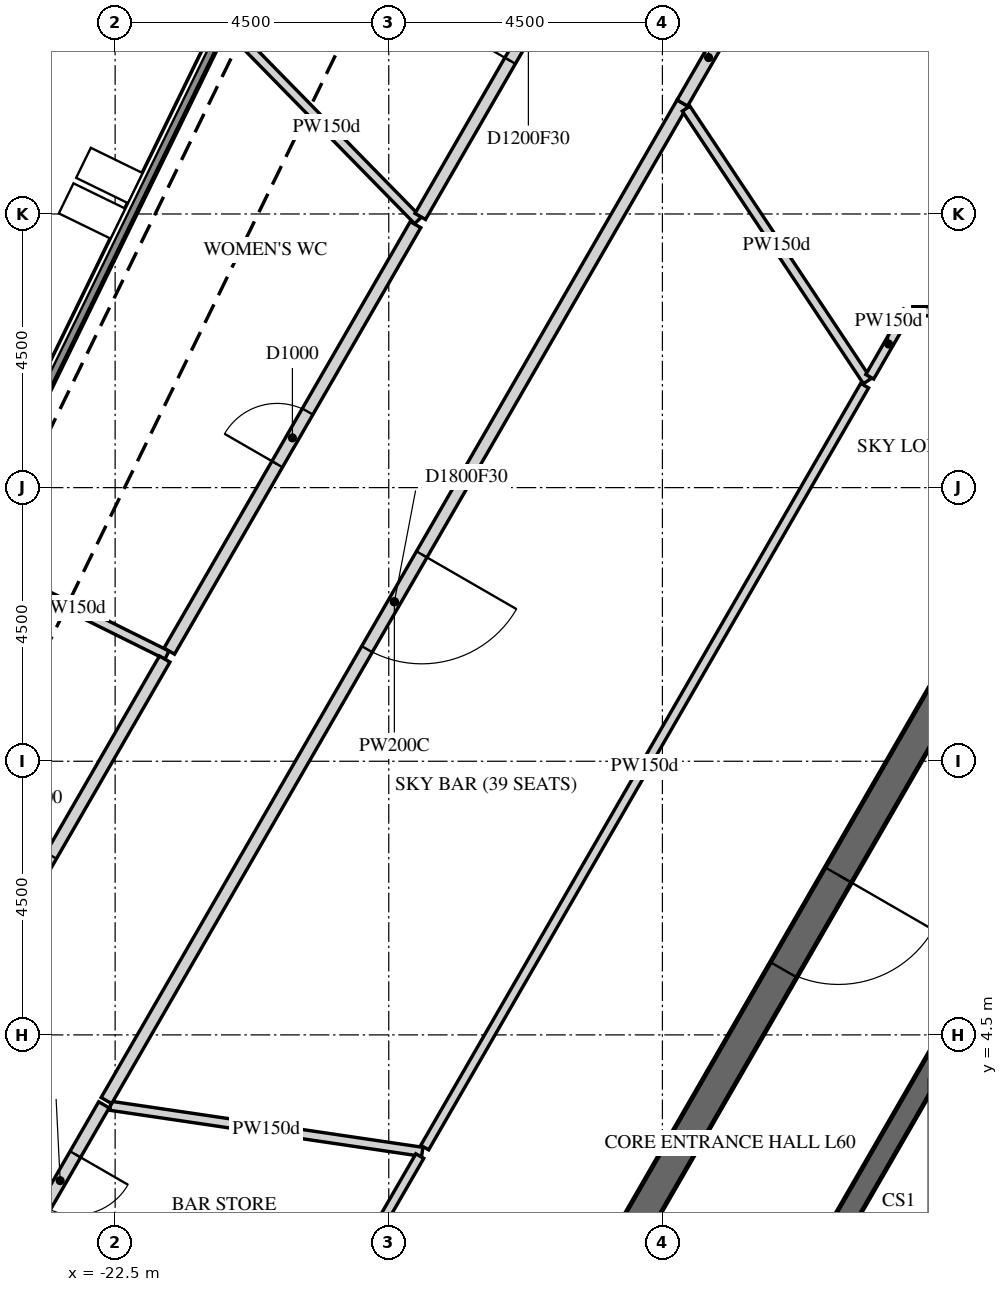
"""IFC4 building model, lengths in metres.
Left out: names, types, materials, properties, quantities, classifications, styles, units other than length and angle.
Written with IfcOpenShell. Run it as: python <this file> out.ifc"""

import sys

from ifc_helpers import new_model, si_unit, direction, frame, frame_2d, origin, place, context, subcontext, project, spatial, polyline, rectangle, outline, extrude, element, fill, save


model = new_model("IFC4")
c1 = context("Model", 3, precision=1e-05, world=origin(), true_north=direction((0.0, 1.0)))
c2 = subcontext(c1, "Body", "Model", "MODEL_VIEW")
j1 = project(units=[si_unit("LENGTHUNIT", "METRE"), si_unit("PLANEANGLEUNIT", "RADIAN")], contexts=[c1])
p1 = place(None, origin())
s1 = spatial("IfcSite", under=j1, at=p1, CompositionType="ELEMENT")
p2 = place(p1, origin())
s2 = spatial("IfcBuilding", under=s1, at=p2, CompositionType="ELEMENT")
p3 = place(p2, frame((0.0, 0.0, 250.2)))
s3 = spatial("IfcBuildingStorey", under=s2, at=p3, CompositionType="ELEMENT", Elevation=250.2)
p4 = place(p3, frame((-30.667, 0.768, 5.7), z_axis=(0.0, 0.0, 1.0), x_axis=(0.43836623679, 0.898796441049, 0.0)))
e1 = element("IfcWall", 1, at=p4, inside=s3, PredefinedType="PARAPET", context=c2, shape_type="SweptSolid", body=[
    extrude(outline(polyline([(0.008, -0.1), (27.731, -0.1), (27.75, 0.1), (-0.008, 0.1), (0.008, -0.1)])), origin(), (0.0, 0.0, 1.0), 1.1),
])
p5 = place(p3, frame((-7.361, 12.75, -0.3), z_axis=(0.0, 0.0, 1.0), x_axis=(-0.50000571537, -0.866022103989, 0.0)))
e2 = element("IfcWall", 2, at=p5, inside=s3, PredefinedType="SHEAR", context=c2, shape_type="SweptSolid", body=[
    extrude(outline(polyline([(-0.144, -0.25), (14.867, -0.25), (14.578, 0.25), (0.144, 0.25), (-0.144, -0.25)])), origin(), (0.0, 0.0, 1.0), 5.8),
])
p6 = place(p5, frame((6.49, 0.0, 0.3)))
e3 = element("IfcOpeningElement", 3, at=p6, cuts=e2, PredefinedType="OPENING", context=c2, shape_type="SweptSolid", body=[
    extrude(rectangle(XDim=1.8, YDim=2.4, at=frame_2d((0.9, 1.2))), frame((0.0, 0.26, 0.0), z_axis=(0.0, -1.0, 0.0), x_axis=(1.0, 0.0, 0.0)), (0.0, 0.0, 1.0), 0.52),
])
p7 = place(p3, frame((-5.673, 9.825, -0.3), z_axis=(0.0, 0.0, 1.0), x_axis=(-0.499995046907, -0.866028263435, 0.0)))
e4 = element("IfcWall", 4, at=p7, inside=s3, PredefinedType="SHEAR", context=c2, shape_type="SweptSolid", body=[
    extrude(outline(polyline([(-0.101, -0.175), (11.446, -0.175), (11.244, 0.175), (0.101, 0.175), (-0.101, -0.175)])), origin(), (0.0, 0.0, 1.0), 5.8),
])
p8 = place(p7, frame((4.801, 0.0, 0.3)))
e5 = element("IfcOpeningElement", 5, at=p8, cuts=e4, PredefinedType="OPENING", context=c2, shape_type="SweptSolid", body=[
    extrude(rectangle(XDim=1.8, YDim=2.4, at=frame_2d((0.9, 1.2))), frame((0.0, 0.185, 0.0), z_axis=(0.0, -1.0, 0.0), x_axis=(1.0, 0.0, 0.0)), (0.0, 0.0, 1.0), 0.37),
])
p9 = place(p3, frame((-24.767, 12.295, 0.0), z_axis=(0.0, 0.0, 1.0), x_axis=(0.895713074793, -0.444632531024, 0.0)))
e6 = element("IfcWall", 6, at=p9, inside=s3, PredefinedType="PARTITIONING", context=c2, shape_type="SweptSolid", body=[
    extrude(rectangle(XDim=3.483, YDim=0.15, at=frame_2d((1.742, 0.0))), origin(), (0.0, 0.0, 1.0), 5.5),
])
p10 = place(p3, frame((-22.684, 3.35, 0.0), z_axis=(0.0, 0.0, 1.0), x_axis=(-0.500041240653, -0.866001592173, 0.0)))
e7 = element("IfcWall", 7, at=p10, inside=s3, PredefinedType="PARTITIONING", context=c2, shape_type="SweptSolid", body=[
    extrude(rectangle(XDim=3.58, YDim=0.2, at=frame_2d((1.79, 0.0))), origin(), (0.0, 0.0, 1.0), 5.5),
])
p11 = place(p10, frame((0.94, 0.0, 0.0)))
e8 = element("IfcOpeningElement", 8, at=p11, cuts=e7, PredefinedType="OPENING", context=c2, shape_type="SweptSolid", body=[
    extrude(rectangle(XDim=1.0, YDim=2.1, at=frame_2d((0.5, 1.05))), frame((0.0, 0.11, 0.0), z_axis=(0.0, -1.0, 0.0), x_axis=(1.0, 0.0, 0.0)), (0.0, 0.0, 1.0), 0.22),
])
p12 = place(p3, frame((-22.578, 3.334, 0.0), z_axis=(0.0, 0.0, 1.0), x_axis=(0.989272631556, -0.146081006478, 0.0)))
e9 = element("IfcWall", 9, at=p12, inside=s3, PredefinedType="PARTITIONING", context=c2, shape_type="SweptSolid", body=[
    extrude(rectangle(XDim=5.184, YDim=0.15, at=frame_2d((2.592, 0.0))), origin(), (0.0, 0.0, 1.0), 5.5),
])
p13 = place(p3, frame((-13.172, 19.825, 0.0), z_axis=(0.0, 0.0, 1.0), x_axis=(-0.499999503755, -0.866025690291, 0.0)))
e10 = element("IfcWall", 10, at=p13, inside=s3, PredefinedType="PARTITIONING", context=c2, shape_type="SweptSolid", body=[
    extrude(rectangle(XDim=18.943, YDim=0.2, at=frame_2d((9.471, 0.0))), origin(), (0.0, 0.0, 1.0), 5.5),
])
p14 = place(p13, frame((8.572, 0.0, 0.0)))
e11 = element("IfcOpeningElement", 11, at=p14, cuts=e10, PredefinedType="OPENING", context=c2, shape_type="SweptSolid", body=[
    extrude(rectangle(XDim=1.8, YDim=2.1, at=frame_2d((0.9, 1.05))), frame((0.0, 0.11, 0.0), z_axis=(0.0, -1.0, 0.0), x_axis=(1.0, 0.0, 0.0)), (0.0, 0.0, 1.0), 0.22),
])
p15 = place(p3, frame((-25.917, 3.349, 0.0), z_axis=(0.0, 0.0, 1.0), x_axis=(0.499982078236, 0.866035750673, 0.0)))
e12 = element("IfcWall", 12, at=p15, inside=s3, PredefinedType="PARTITIONING", context=c2, shape_type="SweptSolid", body=[
    extrude(rectangle(XDim=8.466, YDim=0.2, at=frame_2d((4.233, 0.0))), origin(), (0.0, 0.0, 1.0), 5.5),
])
p16 = place(p15, frame((3.733, 0.0, 0.0)))
e13 = element("IfcOpeningElement", 13, at=p16, cuts=e12, PredefinedType="OPENING", context=c2, shape_type="SweptSolid", body=[
    extrude(rectangle(XDim=1.0, YDim=2.1, at=frame_2d((0.5, 1.05))), frame((0.0, 0.11, 0.0), z_axis=(0.0, -1.0, 0.0), x_axis=(1.0, 0.0, 0.0)), (0.0, 0.0, 1.0), 0.22),
])
p17 = place(p3, frame((-20.527, 20.962, 0.0), z_axis=(0.0, 0.0, 1.0), x_axis=(0.699623583843, -0.714511610074, 0.0)))
e14 = element("IfcWall", 14, at=p17, inside=s3, PredefinedType="PARTITIONING", context=c2, shape_type="SweptSolid", body=[
    extrude(rectangle(XDim=4.296, YDim=0.15, at=frame_2d((2.148, 0.0))), origin(), (0.0, 0.0, 1.0), 5.5),
])
p18 = place(p3, frame((-21.609, 10.811, 0.0), z_axis=(0.0, 0.0, 1.0), x_axis=(0.500032982845, 0.866006360293, 0.0)))
e15 = element("IfcWall", 15, at=p18, inside=s3, PredefinedType="PARTITIONING", context=c2, shape_type="SweptSolid", body=[
    extrude(rectangle(XDim=8.099, YDim=0.2, at=frame_2d((4.049, 0.0))), origin(), (0.0, 0.0, 1.0), 5.5),
])
p19 = place(p18, frame((3.549, 0.0, 0.0)))
e16 = element("IfcOpeningElement", 16, at=p19, cuts=e15, PredefinedType="OPENING", context=c2, shape_type="SweptSolid", body=[
    extrude(rectangle(XDim=1.0, YDim=2.1, at=frame_2d((0.5, 1.05))), frame((0.0, 0.11, 0.0), z_axis=(0.0, -1.0, 0.0), x_axis=(1.0, 0.0, 0.0)), (0.0, 0.0, 1.0), 0.22),
])
p20 = place(p3, frame((-17.489, 2.507, 0.0), z_axis=(0.0, 0.0, 1.0), x_axis=(-0.500168359116, -0.865928179781, 0.0)))
e17 = element("IfcWall", 17, at=p20, inside=s3, PredefinedType="PARTITIONING", context=c2, shape_type="SweptSolid", body=[
    extrude(rectangle(XDim=2.606, YDim=0.15, at=frame_2d((1.303, 0.0))), origin(), (0.0, 0.0, 1.0), 5.5),
])
p21 = place(p3, frame((-17.482, 17.959, 0.0), z_axis=(0.0, 0.0, 1.0), x_axis=(0.499926463787, 0.866067855774, 0.0)))
e18 = element("IfcWall", 18, at=p21, inside=s3, PredefinedType="PARTITIONING", context=c2, shape_type="SweptSolid", body=[
    extrude(rectangle(XDim=7.113, YDim=0.2, at=frame_2d((3.557, 0.0))), origin(), (0.0, 0.0, 1.0), 4.573),
])
p22 = place(p21, frame((2.957, 0.0, 0.0)))
e19 = element("IfcOpeningElement", 19, at=p22, cuts=e18, PredefinedType="OPENING", context=c2, shape_type="SweptSolid", body=[
    extrude(rectangle(XDim=1.2, YDim=2.1, at=frame_2d((0.6, 1.05))), frame((0.0, 0.11, 0.0), z_axis=(0.0, -1.0, 0.0), x_axis=(1.0, 0.0, 0.0)), (0.0, 0.0, 1.0), 0.22),
])
p23 = place(p3, frame((-13.172, 19.825, 0.0), z_axis=(0.0, 0.0, 1.0), x_axis=(0.49992648901, 0.866067841215, 0.0)))
e20 = element("IfcWall", 20, at=p23, inside=s3, PredefinedType="PARTITIONING", context=c2, shape_type="SweptSolid", body=[
    extrude(rectangle(XDim=1.726, YDim=0.2, at=frame_2d((0.863, 0.0))), origin(), (0.0, 0.0, 1.0), 4.573),
])
p24 = place(p3, frame((-13.11, 19.732, 0.0), z_axis=(0.0, 0.0, 1.0), x_axis=(0.553422205017, -0.83290087225, 0.0)))
e21 = element("IfcWall", 21, at=p24, inside=s3, PredefinedType="PARTITIONING", context=c2, shape_type="SweptSolid", body=[
    extrude(rectangle(XDim=5.381, YDim=0.15, at=frame_2d((2.69, 0.0))), origin(), (0.0, 0.0, 1.0), 5.5),
])
p25 = place(p3, frame((-10.174, 15.177, 0.0), z_axis=(0.0, 0.0, 1.0), x_axis=(-0.500018949701, -0.866014462893, 0.0)))
e22 = element("IfcWall", 22, at=p25, inside=s3, PredefinedType="PARTITIONING", context=c2, shape_type="SweptSolid", body=[
    extrude(rectangle(XDim=14.469, YDim=0.15, at=frame_2d((7.235, 0.0))), origin(), (0.0, 0.0, 1.0), 5.5),
])
p26 = place(p3, frame((-9.469, 16.4, 0.0), z_axis=(0.0, 0.0, 1.0), x_axis=(-0.499433504563, -0.866352223128, 0.0)))
e23 = element("IfcWall", 23, at=p26, inside=s3, PredefinedType="PARTITIONING", context=c2, shape_type="SweptSolid", body=[
    extrude(rectangle(XDim=1.244, YDim=0.15, at=frame_2d((0.622, 0.0))), origin(), (0.0, 0.0, 1.0), 5.5),
])
p27 = place(p3, frame((6.493, 16.4, 0.0), z_axis=(0.0, 0.0, 1.0), x_axis=(-1.0, 0.0, 0.0)))
e24 = element("IfcWall", 24, at=p27, inside=s3, PredefinedType="PARTITIONING", context=c2, shape_type="SweptSolid", body=[
    extrude(rectangle(XDim=15.875, YDim=0.15, at=frame_2d((7.938, 0.0))), origin(), (0.0, 0.0, 1.0), 5.5),
])
p28 = place(p6, origin())
e25 = element("IfcDoor", 25, at=p28, inside=s3, OperationType="DOUBLE_DOOR_SINGLE_SWING", PredefinedType="DOOR", context=c2, shape_type="SweptSolid", body=[
    extrude(rectangle(XDim=1.8, YDim=2.4, at=frame_2d((0.9, 1.2))), frame((0.0, 0.025, 0.0), z_axis=(0.0, -1.0, 0.0), x_axis=(1.0, 0.0, 0.0)), (0.0, 0.0, 1.0), 0.05),
])
fill(e3, e25)
p29 = place(p11, origin())
e26 = element("IfcDoor", 26, at=p29, inside=s3, OperationType="SINGLE_SWING_RIGHT", PredefinedType="DOOR", context=c2, shape_type="SweptSolid", body=[
    extrude(rectangle(XDim=1.0, YDim=2.1, at=frame_2d((0.5, 1.05))), frame((0.0, 0.025, 0.0), z_axis=(0.0, -1.0, 0.0), x_axis=(1.0, 0.0, 0.0)), (0.0, 0.0, 1.0), 0.05),
])
fill(e8, e26)
p30 = place(p14, origin())
e27 = element("IfcDoor", 27, at=p30, inside=s3, OperationType="DOUBLE_DOOR_SINGLE_SWING", PredefinedType="DOOR", context=c2, shape_type="SweptSolid", body=[
    extrude(rectangle(XDim=1.8, YDim=2.1, at=frame_2d((0.9, 1.05))), frame((0.0, 0.025, 0.0), z_axis=(0.0, -1.0, 0.0), x_axis=(1.0, 0.0, 0.0)), (0.0, 0.0, 1.0), 0.05),
])
fill(e11, e27)
p31 = place(p16, origin())
e28 = element("IfcDoor", 28, at=p31, inside=s3, OperationType="SINGLE_SWING_RIGHT", PredefinedType="DOOR", context=c2, shape_type="SweptSolid", body=[
    extrude(rectangle(XDim=1.0, YDim=2.1, at=frame_2d((0.5, 1.05))), frame((0.0, 0.025, 0.0), z_axis=(0.0, -1.0, 0.0), x_axis=(1.0, 0.0, 0.0)), (0.0, 0.0, 1.0), 0.05),
])
fill(e13, e28)
p32 = place(p19, origin())
e29 = element("IfcDoor", 29, at=p32, inside=s3, OperationType="SINGLE_SWING_RIGHT", PredefinedType="DOOR", context=c2, shape_type="SweptSolid", body=[
    extrude(rectangle(XDim=1.0, YDim=2.1, at=frame_2d((0.5, 1.05))), frame((0.0, 0.025, 0.0), z_axis=(0.0, -1.0, 0.0), x_axis=(1.0, 0.0, 0.0)), (0.0, 0.0, 1.0), 0.05),
])
fill(e16, e29)
p33 = place(p22, origin())
e30 = element("IfcDoor", 30, at=p33, inside=s3, OperationType="SINGLE_SWING_RIGHT", PredefinedType="DOOR", context=c2, shape_type="SweptSolid", body=[
    extrude(rectangle(XDim=1.2, YDim=2.1, at=frame_2d((0.6, 1.05))), frame((0.0, 0.025, 0.0), z_axis=(0.0, -1.0, 0.0), x_axis=(1.0, 0.0, 0.0)), (0.0, 0.0, 1.0), 0.05),
])
fill(e19, e30)
save(model, sys.argv[1])
